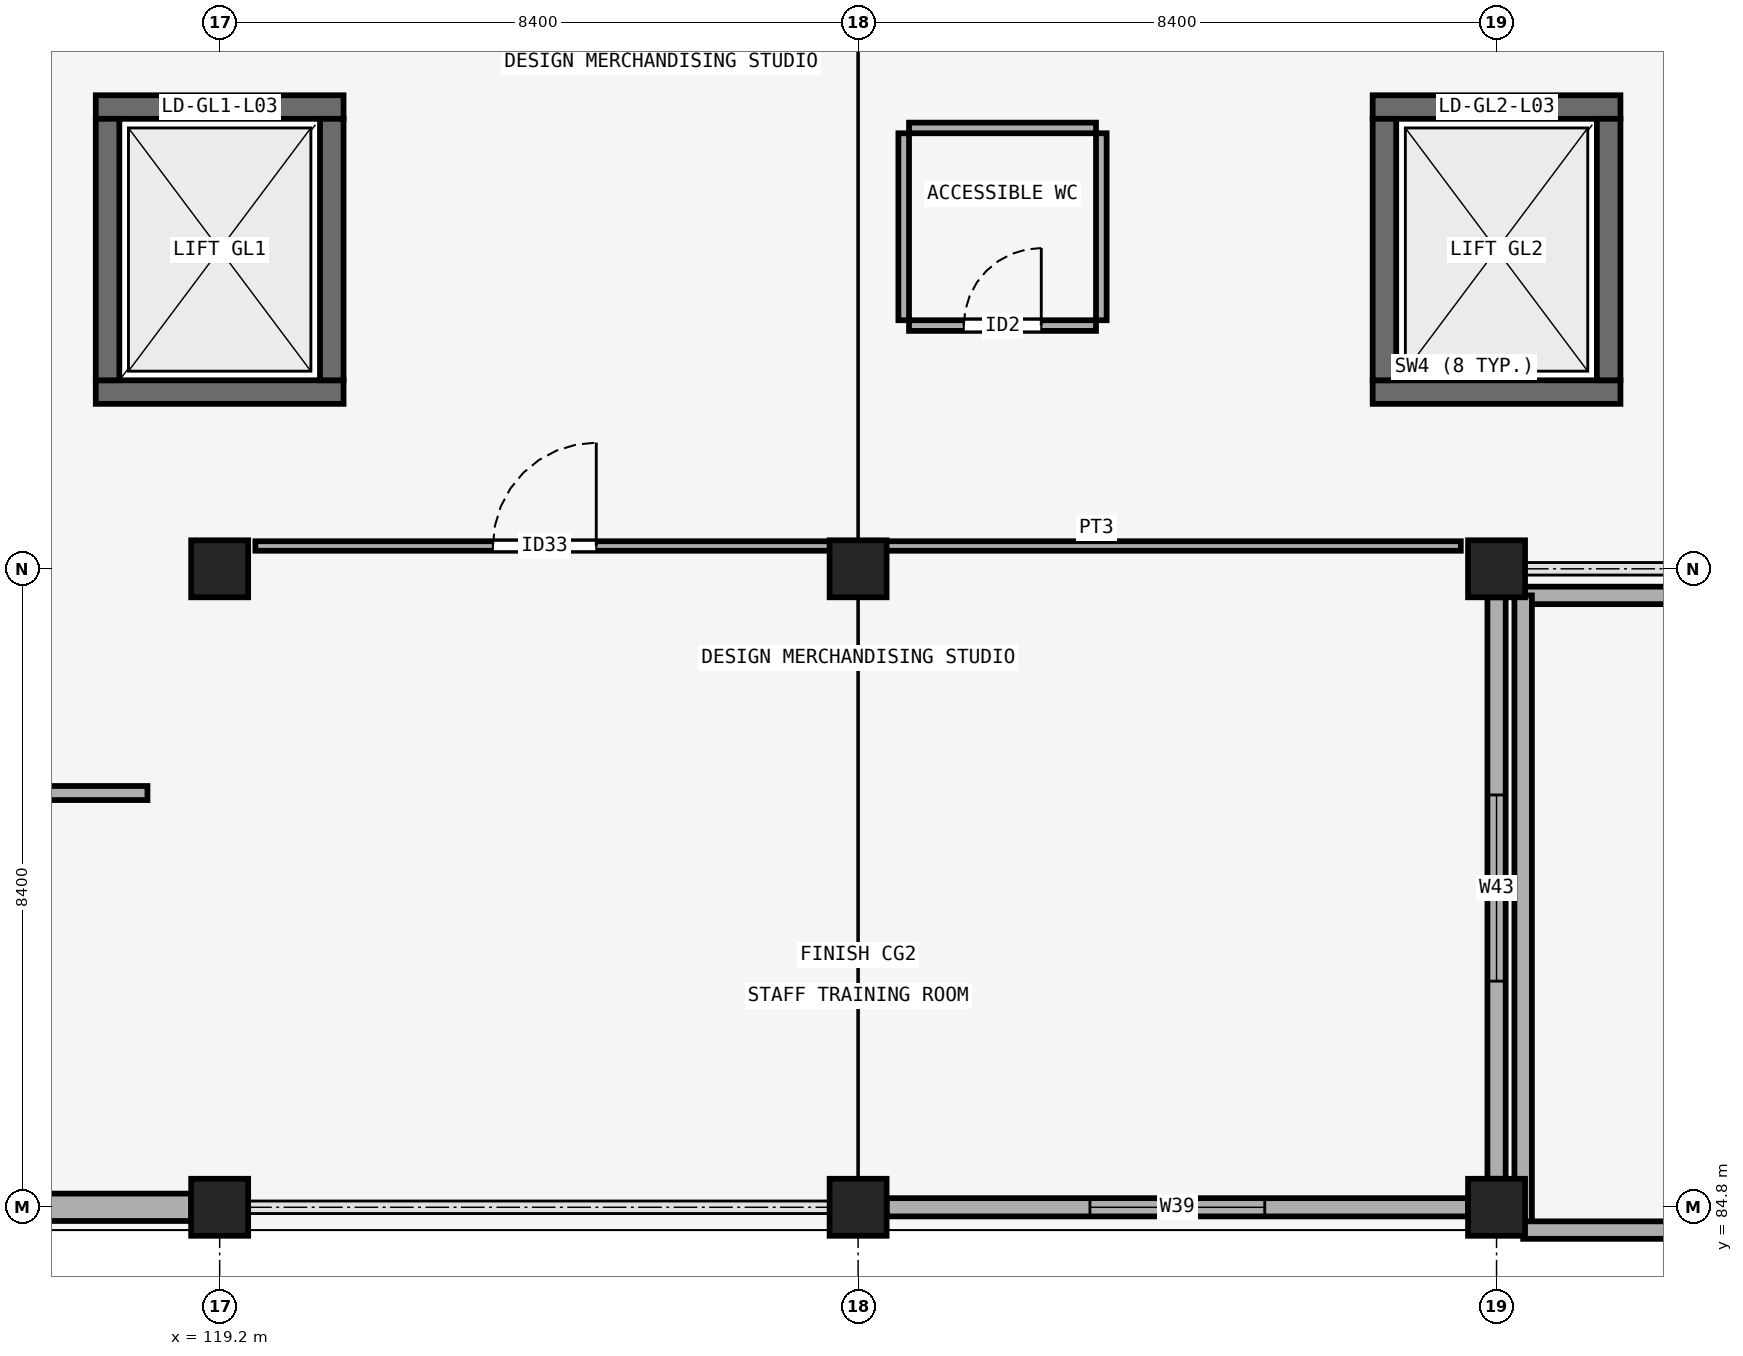
"""IFC4 building model, lengths in metres.
Left out: names, types, materials, properties, quantities, classifications, styles, units other than length and angle.
Written with IfcOpenShell. Run it as: python <this file> out.ifc"""

import sys

from ifc_helpers import new_model, si_unit, direction, frame, frame_2d, origin, origin_2d, place, context, subcontext, project, spatial, rectangle, extrude, element, fill, save


model = new_model("IFC4")
c1 = context("Model", 3, precision=1e-05, world=origin(), true_north=direction((0.0, 1.0)))
c2 = subcontext(c1, "Body", "Model", "MODEL_VIEW")
j1 = project(units=[si_unit("LENGTHUNIT", "METRE"), si_unit("PLANEANGLEUNIT", "RADIAN")], contexts=[c1])
p1 = place(None, origin())
s1 = spatial("IfcSite", under=j1, at=p1, CompositionType="ELEMENT")
p2 = place(p1, origin())
s2 = spatial("IfcBuilding", under=s1, at=p2, CompositionType="ELEMENT")
p3 = place(p2, frame((0.0, 0.0, 14.4)))
s3 = spatial("IfcBuildingStorey", under=s2, at=p3, CompositionType="ELEMENT", Elevation=14.4)
for number, where, z_axis, x_axis in (
    (1, (119.2, 84.8, 0.0), (0.0, 0.0, 1.0), (1.0, 0.0, 0.0)),
    (2, (127.6, 84.8, 0.0), (0.0, 0.0, 1.0), (1.0, 0.0, 0.0)),
    (3, (136.0, 84.8, 0.0), (0.0, 0.0, 1.0), (1.0, 0.0, 0.0)),
    (4, (119.2, 93.2, 0.0), (0.0, 0.0, 1.0), (1.0, 0.0, 0.0)),
    (5, (127.6, 93.2, 0.0), (0.0, 0.0, 1.0), (1.0, 0.0, 0.0)),
    (6, (136.0, 93.2, 0.0), (0.0, 0.0, 1.0), (1.0, 0.0, 0.0)),
):
    element("IfcColumn", number, at=place(p3, frame(where, z_axis=z_axis, x_axis=x_axis)), inside=s3, PredefinedType="COLUMN", context=c2, shape_type="SweptSolid", body=[
        extrude(rectangle(XDim=0.75, YDim=0.75, at=origin_2d()), origin(), (0.0, 0.0, 1.0), 4.5),
    ])
p4 = place(p3, frame((111.175, 84.8, 0.0), z_axis=(0.0, 0.0, 1.0), x_axis=(1.0, 0.0, 0.0)))
e7 = element("IfcWall", 7, at=p4, inside=s3, PredefinedType="SOLIDWALL", context=c2, shape_type="SweptSolid", body=[
    extrude(rectangle(XDim=7.65, YDim=0.36, at=frame_2d((3.825, 0.0))), origin(), (0.0, 0.0, 1.0), 3.49),
])
p5 = place(p4, frame((2.675, 0.0, 0.95)))
e8 = element("IfcOpeningElement", 8, at=p5, cuts=e7, PredefinedType="OPENING", context=c2, shape_type="SweptSolid", body=[
    extrude(rectangle(XDim=2.3, YDim=1.6, at=frame_2d((1.15, 0.8))), frame((0.0, 0.19, 0.0), z_axis=(0.0, -1.0, 0.0), x_axis=(1.0, 0.0, 0.0)), (0.0, 0.0, 1.0), 0.38),
])
p6 = place(p3, frame((127.975, 84.8, 0.0), z_axis=(0.0, 0.0, 1.0), x_axis=(1.0, 0.0, 0.0)))
e9 = element("IfcWall", 9, at=p6, inside=s3, PredefinedType="SOLIDWALL", context=c2, shape_type="SweptSolid", body=[
    extrude(rectangle(XDim=7.65, YDim=0.24, at=frame_2d((3.825, 0.0))), origin(), (0.0, 0.0, 1.0), 3.49),
])
p7 = place(p6, frame((2.675, 0.0, 0.95)))
e10 = element("IfcOpeningElement", 10, at=p7, cuts=e9, PredefinedType="OPENING", context=c2, shape_type="SweptSolid", body=[
    extrude(rectangle(XDim=2.3, YDim=1.85, at=frame_2d((1.15, 0.925))), frame((0.0, 0.13, 0.0), z_axis=(0.0, -1.0, 0.0), x_axis=(1.0, 0.0, 0.0)), (0.0, 0.0, 1.0), 0.26),
])
p8 = place(p3, frame((136.0, 85.175, 0.0), z_axis=(0.0, 0.0, 1.0), x_axis=(0.0, 1.0, 0.0)))
e11 = element("IfcWall", 11, at=p8, inside=s3, PredefinedType="SOLIDWALL", context=c2, shape_type="SweptSolid", body=[
    extrude(rectangle(XDim=7.65, YDim=0.24, at=frame_2d((3.825, 0.0))), origin(), (0.0, 0.0, 1.0), 3.49),
])
p9 = place(p8, frame((2.6, 0.0, 0.95)))
e12 = element("IfcOpeningElement", 12, at=p9, cuts=e11, PredefinedType="OPENING", context=c2, shape_type="SweptSolid", body=[
    extrude(rectangle(XDim=2.45, YDim=1.85, at=frame_2d((1.225, 0.925))), frame((0.0, 0.13, 0.0), z_axis=(0.0, -1.0, 0.0), x_axis=(1.0, 0.0, 0.0)), (0.0, 0.0, 1.0), 0.26),
])
p10 = place(p3, frame((144.7, 92.85, 0.0), z_axis=(0.0, 0.0, 1.0), x_axis=(-1.0, 0.0, 0.0)))
e13 = element("IfcWall", 13, at=p10, inside=s3, PredefinedType="PARAPET", context=c2, shape_type="SweptSolid", body=[
    extrude(rectangle(XDim=8.35, YDim=0.23, at=frame_2d((4.175, 0.0))), origin(), (0.0, 0.0, 1.0), 0.95),
])
p11 = place(p3, frame((136.35, 92.85, 0.0), z_axis=(0.0, 0.0, 1.0), x_axis=(0.0, -1.0, 0.0)))
e14 = element("IfcWall", 14, at=p11, inside=s3, PredefinedType="PARAPET", context=c2, shape_type="SweptSolid", body=[
    extrude(rectangle(XDim=8.35, YDim=0.23, at=frame_2d((4.175, 0.0))), origin(), (0.0, 0.0, 1.0), 0.95),
])
p12 = place(p3, frame((136.35, 84.5, 0.0), z_axis=(0.0, 0.0, 1.0), x_axis=(1.0, 0.0, 0.0)))
e15 = element("IfcWall", 15, at=p12, inside=s3, PredefinedType="PARAPET", context=c2, shape_type="SweptSolid", body=[
    extrude(rectangle(XDim=8.35, YDim=0.23, at=frame_2d((4.175, 0.0))), origin(), (0.0, 0.0, 1.0), 0.95),
])
p13 = place(p3, frame((117.57, 95.525, 0.0), z_axis=(0.0, 0.0, 1.0), x_axis=(1.0, 0.0, 0.0)))
e16 = element("IfcWall", 16, at=p13, inside=s3, PredefinedType="SHEAR", context=c2, shape_type="SweptSolid", body=[
    extrude(rectangle(XDim=3.26, YDim=0.31, at=frame_2d((1.63, 0.0))), origin(), (0.0, 0.0, 1.0), 4.65),
])
p14 = place(p3, frame((117.57, 99.275, 0.0), z_axis=(0.0, 0.0, 1.0), x_axis=(1.0, 0.0, 0.0)))
e17 = element("IfcWall", 17, at=p14, inside=s3, PredefinedType="SHEAR", context=c2, shape_type="SweptSolid", body=[
    extrude(rectangle(XDim=3.26, YDim=0.31, at=frame_2d((1.63, 0.0))), origin(), (0.0, 0.0, 1.0), 4.65),
])
p15 = place(p14, frame((0.88, 0.0, 0.0)))
e18 = element("IfcOpeningElement", 18, at=p15, cuts=e17, PredefinedType="OPENING", context=c2, shape_type="SweptSolid", body=[
    extrude(rectangle(XDim=1.5, YDim=2.35, at=frame_2d((0.75, 1.175))), frame((0.0, 0.165, 0.0), z_axis=(0.0, -1.0, 0.0), x_axis=(1.0, 0.0, 0.0)), (0.0, 0.0, 1.0), 0.33),
])
for number, where, z_axis, x_axis in (
    (19, (117.725, 95.68, 0.0), (0.0, 0.0, 1.0), (0.0, 1.0, 0.0)),
    (20, (120.675, 95.68, 0.0), (0.0, 0.0, 1.0), (0.0, 1.0, 0.0)),
):
    element("IfcWall", number, at=place(p3, frame(where, z_axis=z_axis, x_axis=x_axis)), inside=s3, PredefinedType="SHEAR", context=c2, shape_type="SweptSolid", body=[
        extrude(rectangle(XDim=3.44, YDim=0.31, at=frame_2d((1.72, 0.0))), origin(), (0.0, 0.0, 1.0), 4.65),
    ])
p16 = place(p3, frame((134.37, 95.525, 0.0), z_axis=(0.0, 0.0, 1.0), x_axis=(1.0, 0.0, 0.0)))
e21 = element("IfcWall", 21, at=p16, inside=s3, PredefinedType="SHEAR", context=c2, shape_type="SweptSolid", body=[
    extrude(rectangle(XDim=3.26, YDim=0.31, at=frame_2d((1.63, 0.0))), origin(), (0.0, 0.0, 1.0), 4.65),
])
p17 = place(p3, frame((134.37, 99.275, 0.0), z_axis=(0.0, 0.0, 1.0), x_axis=(1.0, 0.0, 0.0)))
e22 = element("IfcWall", 22, at=p17, inside=s3, PredefinedType="SHEAR", context=c2, shape_type="SweptSolid", body=[
    extrude(rectangle(XDim=3.26, YDim=0.31, at=frame_2d((1.63, 0.0))), origin(), (0.0, 0.0, 1.0), 4.65),
])
p18 = place(p17, frame((0.88, 0.0, 0.0)))
e23 = element("IfcOpeningElement", 23, at=p18, cuts=e22, PredefinedType="OPENING", context=c2, shape_type="SweptSolid", body=[
    extrude(rectangle(XDim=1.5, YDim=2.35, at=frame_2d((0.75, 1.175))), frame((0.0, 0.165, 0.0), z_axis=(0.0, -1.0, 0.0), x_axis=(1.0, 0.0, 0.0)), (0.0, 0.0, 1.0), 0.33),
])
for number, where, z_axis, x_axis in (
    (24, (134.525, 95.68, 0.0), (0.0, 0.0, 1.0), (0.0, 1.0, 0.0)),
    (25, (137.475, 95.68, 0.0), (0.0, 0.0, 1.0), (0.0, 1.0, 0.0)),
):
    element("IfcWall", number, at=place(p3, frame(where, z_axis=z_axis, x_axis=x_axis)), inside=s3, PredefinedType="SHEAR", context=c2, shape_type="SweptSolid", body=[
        extrude(rectangle(XDim=3.44, YDim=0.31, at=frame_2d((1.72, 0.0))), origin(), (0.0, 0.0, 1.0), 4.65),
    ])
p19 = place(p3, frame((128.27, 96.4, 0.0), z_axis=(0.0, 0.0, 1.0), x_axis=(1.0, 0.0, 0.0)))
e26 = element("IfcWall", 26, at=p19, inside=s3, PredefinedType="PARTITIONING", context=c2, shape_type="SweptSolid", body=[
    extrude(rectangle(XDim=2.46, YDim=0.14, at=frame_2d((1.23, 0.0))), origin(), (0.0, 0.0, 1.0), 4.2),
])
p20 = place(p19, frame((0.72, 0.0, 0.0)))
e27 = element("IfcOpeningElement", 27, at=p20, cuts=e26, PredefinedType="OPENING", context=c2, shape_type="SweptSolid", body=[
    extrude(rectangle(XDim=1.02, YDim=2.15, at=frame_2d((0.51, 1.075))), frame((0.0, 0.08, 0.0), z_axis=(0.0, -1.0, 0.0), x_axis=(1.0, 0.0, 0.0)), (0.0, 0.0, 1.0), 0.16),
])
for number, where, z_axis, x_axis in (
    (28, (128.27, 99.0, 0.0), (0.0, 0.0, 1.0), (1.0, 0.0, 0.0)),
    (29, (128.2, 96.47, 0.0), (0.0, 0.0, 1.0), (0.0, 1.0, 0.0)),
    (30, (130.8, 96.47, 0.0), (0.0, 0.0, 1.0), (0.0, 1.0, 0.0)),
):
    element("IfcWall", number, at=place(p3, frame(where, z_axis=z_axis, x_axis=x_axis)), inside=s3, PredefinedType="PARTITIONING", context=c2, shape_type="SweptSolid", body=[
        extrude(rectangle(XDim=2.46, YDim=0.14, at=frame_2d((1.23, 0.0))), origin(), (0.0, 0.0, 1.0), 4.2),
    ])
p21 = place(p3, frame((112.25, 90.25, 0.0), z_axis=(0.0, 0.0, 1.0), x_axis=(1.0, 0.0, 0.0)))
e31 = element("IfcWall", 31, at=p21, inside=s3, PredefinedType="PARTITIONING", context=c2, shape_type="SweptSolid", body=[
    extrude(rectangle(XDim=6.0, YDim=0.185, at=frame_2d((3.0, 0.0))), origin(), (0.0, 0.0, 1.0), 4.2),
])
p22 = place(p21, frame((2.2, 0.0, 0.0)))
e32 = element("IfcOpeningElement", 32, at=p22, cuts=e31, PredefinedType="OPENING", context=c2, shape_type="SweptSolid", body=[
    extrude(rectangle(XDim=1.28, YDim=2.34, at=frame_2d((0.64, 1.17))), frame((0.0, 0.103, 0.0), z_axis=(0.0, -1.0, 0.0), x_axis=(1.0, 0.0, 0.0)), (0.0, 0.0, 1.0), 0.205),
])
p23 = place(p3, frame((119.67, 93.5, 0.0), z_axis=(0.0, 0.0, 1.0), x_axis=(1.0, 0.0, 0.0)))
e33 = element("IfcWall", 33, at=p23, inside=s3, PredefinedType="PARTITIONING", context=c2, shape_type="SweptSolid", body=[
    extrude(rectangle(XDim=7.61, YDim=0.125, at=frame_2d((3.805, 0.0))), origin(), (0.0, 0.0, 1.0), 4.2),
])
p24 = place(p23, frame((3.125, 0.0, 0.0)))
e34 = element("IfcOpeningElement", 34, at=p24, cuts=e33, PredefinedType="OPENING", context=c2, shape_type="SweptSolid", body=[
    extrude(rectangle(XDim=1.36, YDim=2.34, at=frame_2d((0.68, 1.17))), frame((0.0, 0.073, 0.0), z_axis=(0.0, -1.0, 0.0), x_axis=(1.0, 0.0, 0.0)), (0.0, 0.0, 1.0), 0.145),
])
p25 = place(p3, frame((127.92, 93.5, 0.0), z_axis=(0.0, 0.0, 1.0), x_axis=(1.0, 0.0, 0.0)))
e35 = element("IfcWall", 35, at=p25, inside=s3, PredefinedType="PARTITIONING", context=c2, shape_type="SweptSolid", body=[
    extrude(rectangle(XDim=7.61, YDim=0.125, at=frame_2d((3.805, 0.0))), origin(), (0.0, 0.0, 1.0), 4.2),
])
p26 = place(p7, origin())
e36 = element("IfcWindow", 36, at=p26, inside=s3, PartitioningType="DOUBLE_PANEL_VERTICAL", PredefinedType="WINDOW", context=c2, shape_type="SweptSolid", body=[
    extrude(rectangle(XDim=2.3, YDim=1.85, at=frame_2d((1.15, 0.925))), frame((0.0, 0.03, 0.0), z_axis=(0.0, -1.0, 0.0), x_axis=(1.0, 0.0, 0.0)), (0.0, 0.0, 1.0), 0.06),
])
fill(e10, e36)
p27 = place(p9, origin())
e37 = element("IfcWindow", 37, at=p27, inside=s3, PartitioningType="DOUBLE_PANEL_VERTICAL", PredefinedType="WINDOW", context=c2, shape_type="SweptSolid", body=[
    extrude(rectangle(XDim=2.45, YDim=1.85, at=frame_2d((1.225, 0.925))), frame((0.0, 0.03, 0.0), z_axis=(0.0, -1.0, 0.0), x_axis=(1.0, 0.0, 0.0)), (0.0, 0.0, 1.0), 0.06),
])
fill(e12, e37)
p28 = place(p15, origin())
e38 = element("IfcDoor", 38, at=p28, inside=s3, OperationType="SLIDING_TO_LEFT", PredefinedType="DOOR", context=c2, shape_type="SweptSolid", body=[
    extrude(rectangle(XDim=1.5, YDim=2.35, at=frame_2d((0.75, 1.175))), frame((0.0, 0.025, 0.0), z_axis=(0.0, -1.0, 0.0), x_axis=(1.0, 0.0, 0.0)), (0.0, 0.0, 1.0), 0.05),
])
fill(e18, e38)
p29 = place(p18, origin())
e39 = element("IfcDoor", 39, at=p29, inside=s3, OperationType="SLIDING_TO_LEFT", PredefinedType="DOOR", context=c2, shape_type="SweptSolid", body=[
    extrude(rectangle(XDim=1.5, YDim=2.35, at=frame_2d((0.75, 1.175))), frame((0.0, 0.025, 0.0), z_axis=(0.0, -1.0, 0.0), x_axis=(1.0, 0.0, 0.0)), (0.0, 0.0, 1.0), 0.05),
])
fill(e23, e39)
p30 = place(p20, origin())
e40 = element("IfcDoor", 40, at=p30, inside=s3, OperationType="SINGLE_SWING_RIGHT", PredefinedType="DOOR", context=c2, shape_type="SweptSolid", body=[
    extrude(rectangle(XDim=1.02, YDim=2.15, at=frame_2d((0.51, 1.075))), frame((0.0, 0.025, 0.0), z_axis=(0.0, -1.0, 0.0), x_axis=(1.0, 0.0, 0.0)), (0.0, 0.0, 1.0), 0.05),
])
fill(e27, e40)
p31 = place(p24, origin())
e41 = element("IfcDoor", 41, at=p31, inside=s3, OperationType="SINGLE_SWING_RIGHT", PredefinedType="DOOR", context=c2, shape_type="SweptSolid", body=[
    extrude(rectangle(XDim=1.36, YDim=2.34, at=frame_2d((0.68, 1.17))), frame((0.0, 0.025, 0.0), z_axis=(0.0, -1.0, 0.0), x_axis=(1.0, 0.0, 0.0)), (0.0, 0.0, 1.0), 0.05),
])
fill(e34, e41)
save(model, sys.argv[1])
